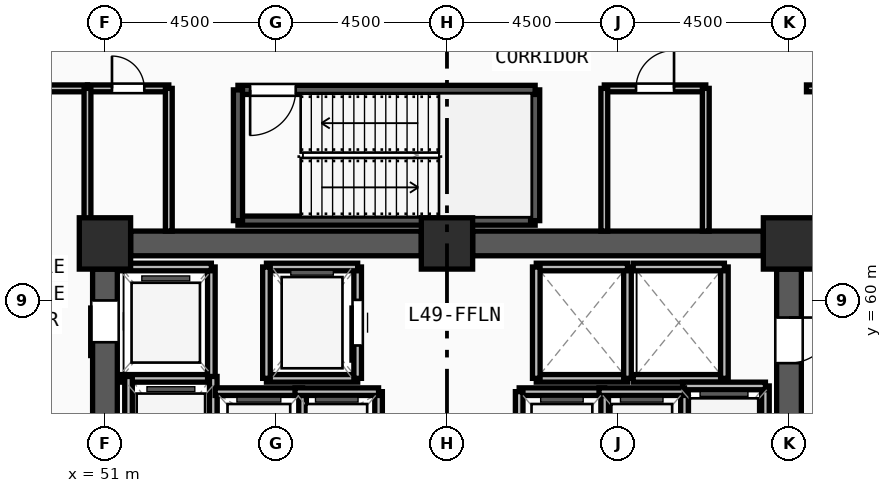
"""IFC4 building model, lengths in metres.
Left out: names, types, materials, properties, quantities, classifications, styles, units other than length and angle.
Written with IfcOpenShell. Run it as: python <this file> out.ifc"""

import sys

from ifc_helpers import new_model, si_unit, direction, frame, frame_2d, origin, origin_2d, place, context, subcontext, project, spatial, rectangle, extrude, source, transform, mapped, element, fill, save


model = new_model("IFC4")
c1 = context("Model", 3, precision=1e-05, world=origin(), true_north=direction((0.0, 1.0)))
c2 = subcontext(c1, "Body", "Model", "MODEL_VIEW")
j1 = project(units=[si_unit("LENGTHUNIT", "METRE"), si_unit("PLANEANGLEUNIT", "RADIAN")], contexts=[c1])
p1 = place(None, origin())
s1 = spatial("IfcSite", under=j1, at=p1, CompositionType="ELEMENT")
p2 = place(p1, origin())
s2 = spatial("IfcBuilding", under=s1, at=p2, CompositionType="ELEMENT")
p3 = place(p2, frame((0.0, 0.0, 189.75)))
s3 = spatial("IfcBuildingStorey", under=s2, at=p3, CompositionType="ELEMENT", Elevation=189.75)
m1 = source(origin(), c2, "Body", "SweptSolid", [
    extrude(rectangle(XDim=1.35, YDim=1.35, at=origin_2d()), origin(), (0.0, 0.0, 1.0), 4.5),
])
for number, where, z_axis, x_axis in (
    (1, (69.0, 61.5, 0.0), (0.0, 0.0, 1.0), (1.0, 0.0, 0.0)),
    (2, (60.0, 61.5, 0.0), (0.0, 0.0, 1.0), (1.0, 0.0, 0.0)),
    (3, (51.0, 61.5, 0.0), (0.0, 0.0, 1.0), (1.0, 0.0, 0.0)),
):
    element("IfcColumn", number, at=place(p3, frame(where, z_axis=z_axis, x_axis=x_axis)), inside=s3, PredefinedType="COLUMN", context=c2, shape_type="MappedRepresentation", body=[
        mapped(m1, transform((0.0, 0.0, 0.0), x_axis=(1.0, 0.0, 0.0), y_axis=(0.0, 1.0, 0.0), z_axis=(0.0, 0.0, 1.0), scale=1.0)),
    ])
for number, where, z_axis, x_axis in (
    (4, (51.675, 61.5, 0.0), (0.0, 0.0, 1.0), (1.0, 0.0, 0.0)),
    (5, (60.675, 61.5, 0.0), (0.0, 0.0, 1.0), (1.0, 0.0, 0.0)),
):
    element("IfcWall", number, at=place(p3, frame(where, z_axis=z_axis, x_axis=x_axis)), inside=s3, PredefinedType="SHEAR", context=c2, shape_type="SweptSolid", body=[
        extrude(rectangle(XDim=7.65, YDim=0.65, at=frame_2d((3.825, 0.0))), origin(), (0.0, 0.0, 1.0), 4.32),
    ])
p4 = place(p3, frame((69.0, 60.825, 0.0), z_axis=(0.0, 0.0, 1.0), x_axis=(0.0, -1.0, 0.0)))
e6 = element("IfcWall", 6, at=p4, inside=s3, PredefinedType="SHEAR", context=c2, shape_type="SweptSolid", body=[
    extrude(rectangle(XDim=13.65, YDim=0.65, at=frame_2d((6.825, 0.0))), origin(), (0.0, 0.0, 1.0), 4.32),
])
m2 = source(origin(), c2, "Body", "SweptSolid", [
    extrude(rectangle(XDim=1.2, YDim=2.2, at=frame_2d((0.6, 1.1))), frame((0.0, 0.335, 0.0), z_axis=(0.0, -1.0, 0.0), x_axis=(1.0, 0.0, 0.0)), (0.0, 0.0, 1.0), 0.67),
])
p5 = place(p4, frame((1.275, 0.0, 0.0)))
e7 = element("IfcOpeningElement", 7, at=p5, cuts=e6, PredefinedType="OPENING", context=c2, shape_type="MappedRepresentation", body=[
    mapped(m2, transform((0.0, 0.0, 0.0), x_axis=(1.0, 0.0, 0.0), y_axis=(0.0, 1.0, 0.0), z_axis=(0.0, 0.0, 1.0), scale=1.0)),
])
p6 = place(p3, frame((51.0, 47.175, 0.0), z_axis=(0.0, 0.0, 1.0), x_axis=(0.0, 1.0, 0.0)))
e8 = element("IfcWall", 8, at=p6, inside=s3, PredefinedType="SHEAR", context=c2, shape_type="SweptSolid", body=[
    extrude(rectangle(XDim=13.65, YDim=0.65, at=frame_2d((6.825, 0.0))), origin(), (0.0, 0.0, 1.0), 4.32),
])
m3 = source(origin(), c2, "Body", "SweptSolid", [
    extrude(rectangle(XDim=1.1, YDim=2.2, at=frame_2d((0.55, 1.1))), frame((0.0, 0.335, 0.0), z_axis=(0.0, -1.0, 0.0), x_axis=(1.0, 0.0, 0.0)), (0.0, 0.0, 1.0), 0.67),
])
p7 = place(p6, frame((11.725, 0.0, 0.0)))
e9 = element("IfcOpeningElement", 9, at=p7, cuts=e8, PredefinedType="OPENING", context=c2, shape_type="MappedRepresentation", body=[
    mapped(m3, transform((0.0, 0.0, 0.0), x_axis=(1.0, 0.0, 0.0), y_axis=(0.0, 1.0, 0.0), z_axis=(0.0, 0.0, 1.0), scale=1.0)),
])
p8 = place(p3, frame((54.5, 62.1, 0.0), z_axis=(0.0, 0.0, 1.0), x_axis=(1.0, 0.0, 0.0)))
e10 = element("IfcWall", 10, at=p8, inside=s3, PredefinedType="SOLIDWALL", context=c2, shape_type="SweptSolid", body=[
    extrude(rectangle(XDim=7.82, YDim=0.24, at=frame_2d((3.91, 0.0))), origin(), (0.0, 0.0, 1.0), 4.32),
])
p9 = place(p3, frame((62.32, 62.1, 0.0), z_axis=(0.0, 0.0, 1.0), x_axis=(0.0, 1.0, 0.0)))
e11 = element("IfcWall", 11, at=p9, inside=s3, PredefinedType="SOLIDWALL", context=c2, shape_type="SweptSolid", body=[
    extrude(rectangle(XDim=3.44, YDim=0.24, at=frame_2d((1.72, 0.0))), origin(), (0.0, 0.0, 1.0), 4.32),
])
p10 = place(p3, frame((62.32, 65.54, 0.0), z_axis=(0.0, 0.0, 1.0), x_axis=(-1.0, 0.0, 0.0)))
e12 = element("IfcWall", 12, at=p10, inside=s3, PredefinedType="SOLIDWALL", context=c2, shape_type="SweptSolid", body=[
    extrude(rectangle(XDim=7.82, YDim=0.24, at=frame_2d((3.91, 0.0))), origin(), (0.0, 0.0, 1.0), 4.32),
])
m4 = source(origin(), c2, "Body", "SweptSolid", [
    extrude(rectangle(XDim=1.2, YDim=2.2, at=frame_2d((0.6, 1.1))), frame((0.0, 0.13, 0.0), z_axis=(0.0, -1.0, 0.0), x_axis=(1.0, 0.0, 0.0)), (0.0, 0.0, 1.0), 0.26),
])
p11 = place(p10, frame((6.3, 0.0, 0.0)))
e13 = element("IfcOpeningElement", 13, at=p11, cuts=e12, PredefinedType="OPENING", context=c2, shape_type="MappedRepresentation", body=[
    mapped(m4, transform((0.0, 0.0, 0.0), x_axis=(1.0, 0.0, 0.0), y_axis=(0.0, 1.0, 0.0), z_axis=(0.0, 0.0, 1.0), scale=1.0)),
])
p12 = place(p3, frame((54.5, 65.54, 0.0), z_axis=(0.0, 0.0, 1.0), x_axis=(0.0, -1.0, 0.0)))
e14 = element("IfcWall", 14, at=p12, inside=s3, PredefinedType="SOLIDWALL", context=c2, shape_type="SweptSolid", body=[
    extrude(rectangle(XDim=3.44, YDim=0.24, at=frame_2d((1.72, 0.0))), origin(), (0.0, 0.0, 1.0), 4.32),
])
p13 = place(p3, frame((55.25, 57.95, 0.0), z_axis=(0.0, 0.0, 1.0), x_axis=(1.0, 0.0, 0.0)))
e15 = element("IfcWall", 15, at=p13, inside=s3, PredefinedType="SOLIDWALL", context=c2, shape_type="SweptSolid", body=[
    extrude(rectangle(XDim=2.4, YDim=0.2, at=frame_2d((1.2, 0.0))), origin(), (0.0, 0.0, 1.0), 4.32),
])
p14 = place(p3, frame((57.65, 57.95, 0.0), z_axis=(0.0, 0.0, 1.0), x_axis=(0.0, 1.0, 0.0)))
e16 = element("IfcWall", 16, at=p14, inside=s3, PredefinedType="SOLIDWALL", context=c2, shape_type="SweptSolid", body=[
    extrude(rectangle(XDim=2.93, YDim=0.2, at=frame_2d((1.465, 0.0))), origin(), (0.0, 0.0, 1.0), 4.32),
])
m5 = source(origin(), c2, "Body", "SweptSolid", [
    extrude(rectangle(XDim=1.2, YDim=2.3, at=frame_2d((0.6, 1.15))), frame((0.0, 0.11, 0.0), z_axis=(0.0, -1.0, 0.0), x_axis=(1.0, 0.0, 0.0)), (0.0, 0.0, 1.0), 0.22),
])
p15 = place(p14, frame((0.865, 0.0, 0.0)))
e17 = element("IfcOpeningElement", 17, at=p15, cuts=e16, PredefinedType="OPENING", context=c2, shape_type="MappedRepresentation", body=[
    mapped(m5, transform((0.0, 0.0, 0.0), x_axis=(1.0, 0.0, 0.0), y_axis=(0.0, 1.0, 0.0), z_axis=(0.0, 0.0, 1.0), scale=1.0)),
])
p16 = place(p3, frame((57.65, 60.88, 0.0), z_axis=(0.0, 0.0, 1.0), x_axis=(-1.0, 0.0, 0.0)))
e18 = element("IfcWall", 18, at=p16, inside=s3, PredefinedType="SOLIDWALL", context=c2, shape_type="SweptSolid", body=[
    extrude(rectangle(XDim=2.4, YDim=0.2, at=frame_2d((1.2, 0.0))), origin(), (0.0, 0.0, 1.0), 4.32),
])
p17 = place(p3, frame((55.25, 60.88, 0.0), z_axis=(0.0, 0.0, 1.0), x_axis=(0.0, -1.0, 0.0)))
e19 = element("IfcWall", 19, at=p17, inside=s3, PredefinedType="SOLIDWALL", context=c2, shape_type="SweptSolid", body=[
    extrude(rectangle(XDim=2.93, YDim=0.2, at=frame_2d((1.465, 0.0))), origin(), (0.0, 0.0, 1.0), 4.32),
])
p18 = place(p3, frame((62.35, 57.95, 0.0), z_axis=(0.0, 0.0, 1.0), x_axis=(1.0, 0.0, 0.0)))
e20 = element("IfcWall", 20, at=p18, inside=s3, PredefinedType="SOLIDWALL", context=c2, shape_type="SweptSolid", body=[
    extrude(rectangle(XDim=2.4, YDim=0.2, at=frame_2d((1.2, 0.0))), origin(), (0.0, 0.0, 1.0), 4.32),
])
p19 = place(p3, frame((64.75, 57.95, 0.0), z_axis=(0.0, 0.0, 1.0), x_axis=(0.0, 1.0, 0.0)))
e21 = element("IfcWall", 21, at=p19, inside=s3, PredefinedType="SOLIDWALL", context=c2, shape_type="SweptSolid", body=[
    extrude(rectangle(XDim=2.93, YDim=0.2, at=frame_2d((1.465, 0.0))), origin(), (0.0, 0.0, 1.0), 4.32),
])
p20 = place(p3, frame((64.75, 60.88, 0.0), z_axis=(0.0, 0.0, 1.0), x_axis=(-1.0, 0.0, 0.0)))
e22 = element("IfcWall", 22, at=p20, inside=s3, PredefinedType="SOLIDWALL", context=c2, shape_type="SweptSolid", body=[
    extrude(rectangle(XDim=2.4, YDim=0.2, at=frame_2d((1.2, 0.0))), origin(), (0.0, 0.0, 1.0), 4.32),
])
p21 = place(p3, frame((62.35, 60.88, 0.0), z_axis=(0.0, 0.0, 1.0), x_axis=(0.0, -1.0, 0.0)))
e23 = element("IfcWall", 23, at=p21, inside=s3, PredefinedType="SOLIDWALL", context=c2, shape_type="SweptSolid", body=[
    extrude(rectangle(XDim=2.93, YDim=0.2, at=frame_2d((1.465, 0.0))), origin(), (0.0, 0.0, 1.0), 4.32),
])
p22 = place(p3, frame((64.9, 57.95, 0.0), z_axis=(0.0, 0.0, 1.0), x_axis=(1.0, 0.0, 0.0)))
e24 = element("IfcWall", 24, at=p22, inside=s3, PredefinedType="SOLIDWALL", context=c2, shape_type="SweptSolid", body=[
    extrude(rectangle(XDim=2.4, YDim=0.2, at=frame_2d((1.2, 0.0))), origin(), (0.0, 0.0, 1.0), 4.32),
])
p23 = place(p3, frame((67.3, 57.95, 0.0), z_axis=(0.0, 0.0, 1.0), x_axis=(0.0, 1.0, 0.0)))
e25 = element("IfcWall", 25, at=p23, inside=s3, PredefinedType="SOLIDWALL", context=c2, shape_type="SweptSolid", body=[
    extrude(rectangle(XDim=2.93, YDim=0.2, at=frame_2d((1.465, 0.0))), origin(), (0.0, 0.0, 1.0), 4.32),
])
for number, where, z_axis, x_axis in (
    (26, (67.3, 60.88, 0.0), (0.0, 0.0, 1.0), (-1.0, 0.0, 0.0)),
    (27, (51.4, 57.95, 0.0), (0.0, 0.0, 1.0), (1.0, 0.0, 0.0)),
):
    element("IfcWall", number, at=place(p3, frame(where, z_axis=z_axis, x_axis=x_axis)), inside=s3, PredefinedType="SOLIDWALL", context=c2, shape_type="SweptSolid", body=[
        extrude(rectangle(XDim=2.4, YDim=0.2, at=frame_2d((1.2, 0.0))), origin(), (0.0, 0.0, 1.0), 4.32),
    ])
p24 = place(p3, frame((53.8, 57.95, 0.0), z_axis=(0.0, 0.0, 1.0), x_axis=(0.0, 1.0, 0.0)))
e28 = element("IfcWall", 28, at=p24, inside=s3, PredefinedType="SOLIDWALL", context=c2, shape_type="SweptSolid", body=[
    extrude(rectangle(XDim=2.93, YDim=0.2, at=frame_2d((1.465, 0.0))), origin(), (0.0, 0.0, 1.0), 4.32),
])
p25 = place(p3, frame((53.8, 60.88, 0.0), z_axis=(0.0, 0.0, 1.0), x_axis=(-1.0, 0.0, 0.0)))
e29 = element("IfcWall", 29, at=p25, inside=s3, PredefinedType="SOLIDWALL", context=c2, shape_type="SweptSolid", body=[
    extrude(rectangle(XDim=2.4, YDim=0.2, at=frame_2d((1.2, 0.0))), origin(), (0.0, 0.0, 1.0), 4.32),
])
for number, where, z_axis, x_axis in (
    (30, (53.85, 55.0, 0.0), (0.0, 0.0, 1.0), (0.0, 1.0, 0.0)),
    (31, (51.62, 58.0, 0.0), (0.0, 0.0, 1.0), (0.0, -1.0, 0.0)),
):
    element("IfcWall", number, at=place(p3, frame(where, z_axis=z_axis, x_axis=x_axis)), inside=s3, PredefinedType="SOLIDWALL", context=c2, shape_type="SweptSolid", body=[
        extrude(rectangle(XDim=3.0, YDim=0.2, at=frame_2d((1.5, 0.0))), origin(), (0.0, 0.0, 1.0), 4.32),
    ])
p26 = place(p3, frame((68.38, 55.0, 0.0), z_axis=(0.0, 0.0, 1.0), x_axis=(0.0, 1.0, 0.0)))
e32 = element("IfcWall", 32, at=p26, inside=s3, PredefinedType="SOLIDWALL", context=c2, shape_type="SweptSolid", body=[
    extrude(rectangle(XDim=2.75, YDim=0.2, at=frame_2d((1.375, 0.0))), origin(), (0.0, 0.0, 1.0), 4.32),
])
p27 = place(p3, frame((68.38, 57.75, 0.0), z_axis=(0.0, 0.0, 1.0), x_axis=(-1.0, 0.0, 0.0)))
e33 = element("IfcWall", 33, at=p27, inside=s3, PredefinedType="SOLIDWALL", context=c2, shape_type="SweptSolid", body=[
    extrude(rectangle(XDim=2.18, YDim=0.2, at=frame_2d((1.09, 0.0))), origin(), (0.0, 0.0, 1.0), 4.32),
])
p28 = place(p3, frame((56.2, 55.0, 0.0), z_axis=(0.0, 0.0, 1.0), x_axis=(0.0, 1.0, 0.0)))
e34 = element("IfcWall", 34, at=p28, inside=s3, PredefinedType="SOLIDWALL", context=c2, shape_type="SweptSolid", body=[
    extrude(rectangle(XDim=2.6, YDim=0.2, at=frame_2d((1.3, 0.0))), origin(), (0.0, 0.0, 1.0), 4.32),
])
p29 = place(p3, frame((56.2, 57.6, 0.0), z_axis=(0.0, 0.0, 1.0), x_axis=(-1.0, 0.0, 0.0)))
e35 = element("IfcWall", 35, at=p29, inside=s3, PredefinedType="SOLIDWALL", context=c2, shape_type="SweptSolid", body=[
    extrude(rectangle(XDim=2.3, YDim=0.2, at=frame_2d((1.15, 0.0))), origin(), (0.0, 0.0, 1.0), 4.32),
])
p30 = place(p3, frame((58.2, 55.0, 0.0), z_axis=(0.0, 0.0, 1.0), x_axis=(0.0, 1.0, 0.0)))
e36 = element("IfcWall", 36, at=p30, inside=s3, PredefinedType="SOLIDWALL", context=c2, shape_type="SweptSolid", body=[
    extrude(rectangle(XDim=2.6, YDim=0.2, at=frame_2d((1.3, 0.0))), origin(), (0.0, 0.0, 1.0), 4.32),
])
p31 = place(p3, frame((58.2, 57.6, 0.0), z_axis=(0.0, 0.0, 1.0), x_axis=(-1.0, 0.0, 0.0)))
e37 = element("IfcWall", 37, at=p31, inside=s3, PredefinedType="SOLIDWALL", context=c2, shape_type="SweptSolid", body=[
    extrude(rectangle(XDim=2.2, YDim=0.2, at=frame_2d((1.1, 0.0))), origin(), (0.0, 0.0, 1.0), 4.32),
])
p32 = place(p3, frame((64.15, 55.0, 0.0), z_axis=(0.0, 0.0, 1.0), x_axis=(0.0, 1.0, 0.0)))
e38 = element("IfcWall", 38, at=p32, inside=s3, PredefinedType="SOLIDWALL", context=c2, shape_type="SweptSolid", body=[
    extrude(rectangle(XDim=2.6, YDim=0.2, at=frame_2d((1.3, 0.0))), origin(), (0.0, 0.0, 1.0), 4.32),
])
p33 = place(p3, frame((64.15, 57.6, 0.0), z_axis=(0.0, 0.0, 1.0), x_axis=(-1.0, 0.0, 0.0)))
e39 = element("IfcWall", 39, at=p33, inside=s3, PredefinedType="SOLIDWALL", context=c2, shape_type="SweptSolid", body=[
    extrude(rectangle(XDim=2.25, YDim=0.2, at=frame_2d((1.125, 0.0))), origin(), (0.0, 0.0, 1.0), 4.32),
])
for number, where, z_axis, x_axis in (
    (40, (61.9, 57.6, 0.0), (0.0, 0.0, 1.0), (0.0, -1.0, 0.0)),
    (41, (66.25, 55.0, 0.0), (0.0, 0.0, 1.0), (0.0, 1.0, 0.0)),
):
    element("IfcWall", number, at=place(p3, frame(where, z_axis=z_axis, x_axis=x_axis)), inside=s3, PredefinedType="SOLIDWALL", context=c2, shape_type="SweptSolid", body=[
        extrude(rectangle(XDim=2.6, YDim=0.2, at=frame_2d((1.3, 0.0))), origin(), (0.0, 0.0, 1.0), 4.32),
    ])
p34 = place(p3, frame((66.25, 57.6, 0.0), z_axis=(0.0, 0.0, 1.0), x_axis=(-1.0, 0.0, 0.0)))
e42 = element("IfcWall", 42, at=p34, inside=s3, PredefinedType="SOLIDWALL", context=c2, shape_type="SweptSolid", body=[
    extrude(rectangle(XDim=2.25, YDim=0.2, at=frame_2d((1.125, 0.0))), origin(), (0.0, 0.0, 1.0), 4.32),
])
p35 = place(p3, frame((50.54, 65.58, 0.0), z_axis=(0.0, 0.0, 1.0), x_axis=(1.0, 0.0, 0.0)))
e43 = element("IfcWall", 43, at=p35, inside=s3, PredefinedType="PARTITIONING", context=c2, shape_type="SweptSolid", body=[
    extrude(rectangle(XDim=2.14, YDim=0.18, at=frame_2d((1.07, 0.0))), origin(), (0.0, 0.0, 1.0), 4.32),
])
m6 = source(origin(), c2, "Body", "SweptSolid", [
    extrude(rectangle(XDim=0.85, YDim=2.1, at=frame_2d((0.425, 1.05))), frame((0.0, 0.1, 0.0), z_axis=(0.0, -1.0, 0.0), x_axis=(1.0, 0.0, 0.0)), (0.0, 0.0, 1.0), 0.2),
])
p36 = place(p35, frame((0.645, 0.0, 0.0)))
e44 = element("IfcOpeningElement", 44, at=p36, cuts=e43, PredefinedType="OPENING", context=c2, shape_type="MappedRepresentation", body=[
    mapped(m6, transform((0.0, 0.0, 0.0), x_axis=(1.0, 0.0, 0.0), y_axis=(0.0, 1.0, 0.0), z_axis=(0.0, 0.0, 1.0), scale=1.0)),
])
p37 = place(p3, frame((64.14, 65.58, 0.0), z_axis=(0.0, 0.0, 1.0), x_axis=(1.0, 0.0, 0.0)))
e45 = element("IfcWall", 45, at=p37, inside=s3, PredefinedType="PARTITIONING", context=c2, shape_type="SweptSolid", body=[
    extrude(rectangle(XDim=2.67, YDim=0.18, at=frame_2d((1.335, 0.0))), origin(), (0.0, 0.0, 1.0), 4.32),
])
m7 = source(origin(), c2, "Body", "SweptSolid", [
    extrude(rectangle(XDim=1.0, YDim=2.2, at=frame_2d((0.5, 1.1))), frame((0.0, 0.1, 0.0), z_axis=(0.0, -1.0, 0.0), x_axis=(1.0, 0.0, 0.0)), (0.0, 0.0, 1.0), 0.2),
])
p38 = place(p37, frame((0.835, 0.0, 0.0)))
e46 = element("IfcOpeningElement", 46, at=p38, cuts=e45, PredefinedType="OPENING", context=c2, shape_type="MappedRepresentation", body=[
    mapped(m7, transform((0.0, 0.0, 0.0), x_axis=(1.0, 0.0, 0.0), y_axis=(0.0, 1.0, 0.0), z_axis=(0.0, 0.0, 1.0), scale=1.0)),
])
p39 = place(p3, frame((46.7, 65.58, 0.0), z_axis=(0.0, 0.0, 1.0), x_axis=(1.0, 0.0, 0.0)))
e47 = element("IfcWall", 47, at=p39, inside=s3, PredefinedType="PARTITIONING", context=c2, shape_type="SweptSolid", body=[
    extrude(rectangle(XDim=3.84, YDim=0.18, at=frame_2d((1.92, 0.0))), origin(), (0.0, 0.0, 1.0), 4.32),
])
m8 = source(origin(), c2, "Body", "SweptSolid", [
    extrude(rectangle(XDim=1.3, YDim=2.2, at=frame_2d((0.65, 1.1))), frame((0.0, 0.1, 0.0), z_axis=(0.0, -1.0, 0.0), x_axis=(1.0, 0.0, 0.0)), (0.0, 0.0, 1.0), 0.2),
])
p40 = place(p39, frame((1.27, 0.0, 0.0)))
e48 = element("IfcOpeningElement", 48, at=p40, cuts=e47, PredefinedType="OPENING", context=c2, shape_type="MappedRepresentation", body=[
    mapped(m8, transform((0.0, 0.0, 0.0), x_axis=(1.0, 0.0, 0.0), y_axis=(0.0, 1.0, 0.0), z_axis=(0.0, 0.0, 1.0), scale=1.0)),
])
p41 = place(p3, frame((69.46, 65.58, 0.0), z_axis=(0.0, 0.0, 1.0), x_axis=(1.0, 0.0, 0.0)))
e49 = element("IfcWall", 49, at=p41, inside=s3, PredefinedType="PARTITIONING", context=c2, shape_type="SweptSolid", body=[
    extrude(rectangle(XDim=3.84, YDim=0.18, at=frame_2d((1.92, 0.0))), origin(), (0.0, 0.0, 1.0), 4.32),
])
p42 = place(p41, frame((1.27, 0.0, 0.0)))
e50 = element("IfcOpeningElement", 50, at=p42, cuts=e49, PredefinedType="OPENING", context=c2, shape_type="MappedRepresentation", body=[
    mapped(m8, transform((0.0, 0.0, 0.0), x_axis=(1.0, 0.0, 0.0), y_axis=(0.0, 1.0, 0.0), z_axis=(0.0, 0.0, 1.0), scale=1.0)),
])
p43 = place(p3, frame((50.54, 61.95, 0.0), z_axis=(0.0, 0.0, 1.0), x_axis=(0.0, 1.0, 0.0)))
e51 = element("IfcWall", 51, at=p43, inside=s3, PredefinedType="PARTITIONING", context=c2, shape_type="SweptSolid", body=[
    extrude(rectangle(XDim=3.63, YDim=0.18, at=frame_2d((1.815, 0.0))), origin(), (0.0, 0.0, 1.0), 4.32),
])
for number, where, z_axis, x_axis in (
    (52, (52.68, 61.825, 0.0), (0.0, 0.0, 1.0), (0.0, 1.0, 0.0)),
    (53, (64.14, 61.825, 0.0), (0.0, 0.0, 1.0), (0.0, 1.0, 0.0)),
    (54, (66.81, 61.825, 0.0), (0.0, 0.0, 1.0), (0.0, 1.0, 0.0)),
):
    element("IfcWall", number, at=place(p3, frame(where, z_axis=z_axis, x_axis=x_axis)), inside=s3, PredefinedType="PARTITIONING", context=c2, shape_type="SweptSolid", body=[
        extrude(rectangle(XDim=3.755, YDim=0.18, at=frame_2d((1.877, 0.0))), origin(), (0.0, 0.0, 1.0), 4.32),
    ])
m9 = source(origin(), c2, "Body", "SweptSolid", [
    extrude(rectangle(XDim=1.2, YDim=2.2, at=frame_2d((0.6, 1.1))), frame((0.0, 0.025, 0.0), z_axis=(0.0, -1.0, 0.0), x_axis=(1.0, 0.0, 0.0)), (0.0, 0.0, 1.0), 0.05),
])
p44 = place(p5, origin())
e55 = element("IfcDoor", 55, at=p44, inside=s3, OperationType="SINGLE_SWING_LEFT", PredefinedType="DOOR", context=c2, shape_type="MappedRepresentation", body=[
    mapped(m9, transform((0.0, 0.0, 0.0), x_axis=(1.0, 0.0, 0.0), y_axis=(0.0, 1.0, 0.0), z_axis=(0.0, 0.0, 1.0), scale=1.0)),
])
fill(e7, e55)
p45 = place(p11, origin())
e56 = element("IfcDoor", 56, at=p45, inside=s3, OperationType="SINGLE_SWING_RIGHT", PredefinedType="DOOR", context=c2, shape_type="MappedRepresentation", body=[
    mapped(m9, transform((0.0, 0.0, 0.0), x_axis=(1.0, 0.0, 0.0), y_axis=(0.0, 1.0, 0.0), z_axis=(0.0, 0.0, 1.0), scale=1.0)),
])
fill(e13, e56)
m10 = source(origin(), c2, "Body", "SweptSolid", [
    extrude(rectangle(XDim=1.2, YDim=2.3, at=frame_2d((0.6, 1.15))), frame((0.0, 0.025, 0.0), z_axis=(0.0, -1.0, 0.0), x_axis=(1.0, 0.0, 0.0)), (0.0, 0.0, 1.0), 0.05),
])
p46 = place(p15, origin())
e57 = element("IfcDoor", 57, at=p46, inside=s3, OperationType="SLIDING_TO_LEFT", PredefinedType="DOOR", context=c2, shape_type="MappedRepresentation", body=[
    mapped(m10, transform((0.0, 0.0, 0.0), x_axis=(1.0, 0.0, 0.0), y_axis=(0.0, 1.0, 0.0), z_axis=(0.0, 0.0, 1.0), scale=1.0)),
])
fill(e17, e57)
m11 = source(origin(), c2, "Body", "SweptSolid", [
    extrude(rectangle(XDim=1.1, YDim=2.2, at=frame_2d((0.55, 1.1))), frame((0.0, 0.025, 0.0), z_axis=(0.0, -1.0, 0.0), x_axis=(1.0, 0.0, 0.0)), (0.0, 0.0, 1.0), 0.05),
])
p47 = place(p7, origin())
e58 = element("IfcDoor", 58, at=p47, inside=s3, OperationType="SLIDING_TO_LEFT", PredefinedType="DOOR", context=c2, shape_type="MappedRepresentation", body=[
    mapped(m11, transform((0.0, 0.0, 0.0), x_axis=(1.0, 0.0, 0.0), y_axis=(0.0, 1.0, 0.0), z_axis=(0.0, 0.0, 1.0), scale=1.0)),
])
fill(e9, e58)
m12 = source(origin(), c2, "Body", "SweptSolid", [
    extrude(rectangle(XDim=0.85, YDim=2.1, at=frame_2d((0.425, 1.05))), frame((0.0, 0.025, 0.0), z_axis=(0.0, -1.0, 0.0), x_axis=(1.0, 0.0, 0.0)), (0.0, 0.0, 1.0), 0.05),
])
p48 = place(p36, origin())
e59 = element("IfcDoor", 59, at=p48, inside=s3, OperationType="SINGLE_SWING_LEFT", PredefinedType="DOOR", context=c2, shape_type="MappedRepresentation", body=[
    mapped(m12, transform((0.0, 0.0, 0.0), x_axis=(1.0, 0.0, 0.0), y_axis=(0.0, 1.0, 0.0), z_axis=(0.0, 0.0, 1.0), scale=1.0)),
])
fill(e44, e59)
m13 = source(origin(), c2, "Body", "SweptSolid", [
    extrude(rectangle(XDim=1.0, YDim=2.2, at=frame_2d((0.5, 1.1))), frame((0.0, 0.025, 0.0), z_axis=(0.0, -1.0, 0.0), x_axis=(1.0, 0.0, 0.0)), (0.0, 0.0, 1.0), 0.05),
])
p49 = place(p38, origin())
e60 = element("IfcDoor", 60, at=p49, inside=s3, OperationType="SINGLE_SWING_RIGHT", PredefinedType="DOOR", context=c2, shape_type="MappedRepresentation", body=[
    mapped(m13, transform((0.0, 0.0, 0.0), x_axis=(1.0, 0.0, 0.0), y_axis=(0.0, 1.0, 0.0), z_axis=(0.0, 0.0, 1.0), scale=1.0)),
])
fill(e46, e60)
save(model, sys.argv[1])
